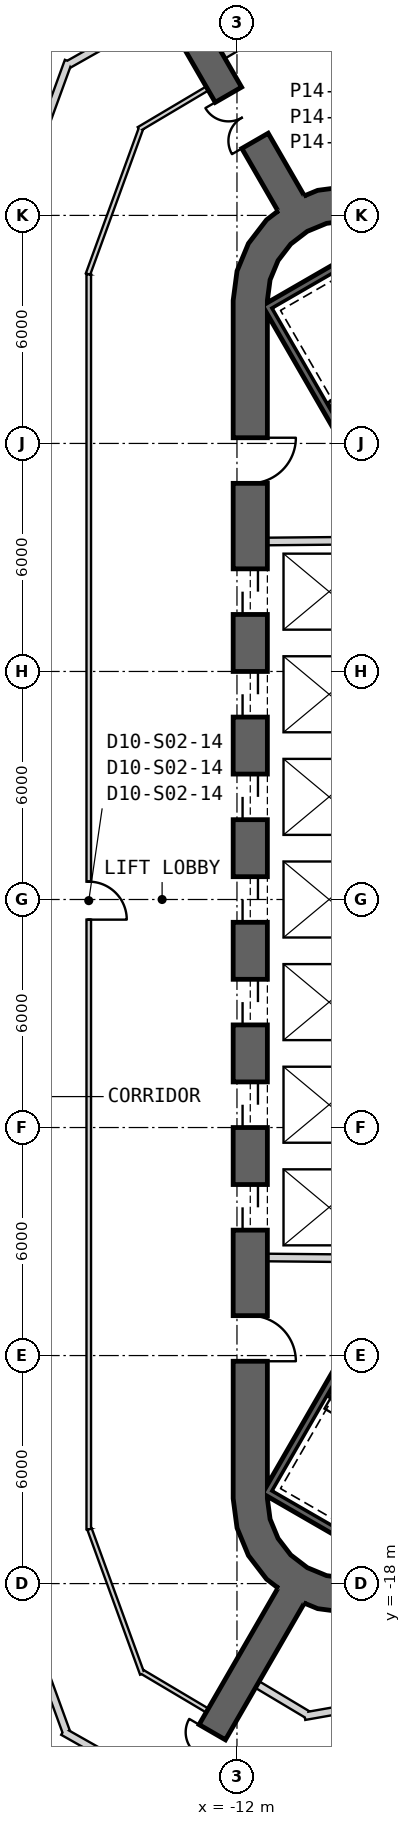
"""IFC4 building model, lengths in metres.
Left out: names, types, materials, properties, quantities, classifications, styles, units other than length and angle.
Written with IfcOpenShell. Run it as: python <this file> out.ifc"""

import sys

from ifc_helpers import new_model, si_unit, direction, frame, frame_2d, origin, place, context, subcontext, project, spatial, polyline, rectangle, outline, extrude, element, fill, save


model = new_model("IFC4")
c1 = context("Model", 3, precision=1e-05, world=origin(), true_north=direction((0.0, 1.0)))
c2 = subcontext(c1, "Body", "Model", "MODEL_VIEW")
j1 = project(units=[si_unit("LENGTHUNIT", "METRE"), si_unit("PLANEANGLEUNIT", "RADIAN")], contexts=[c1])
p1 = place(None, origin())
s1 = spatial("IfcSite", under=j1, at=p1, CompositionType="ELEMENT")
p2 = place(p1, origin())
s2 = spatial("IfcBuilding", under=s1, at=p2, CompositionType="ELEMENT")
p3 = place(p2, frame((0.0, 0.0, 70.1)))
s3 = spatial("IfcBuildingStorey", under=s2, at=p3, CompositionType="ELEMENT", Elevation=70.1)
p4 = place(p3, frame((-11.65, 15.762, 0.0), z_axis=(0.0, 0.0, 1.0), x_axis=(0.0, -1.0, 0.0)))
e1 = element("IfcWall", 1, at=p4, inside=s3, PredefinedType="SHEAR", context=c2, shape_type="SweptSolid", body=[
    extrude(rectangle(XDim=31.523, YDim=0.9, at=frame_2d((15.762, 0.0))), origin(), (0.0, 0.0, 1.0), 4.1),
])
p5 = place(p4, frame((7.062, 0.0, 0.0)))
e2 = element("IfcOpeningElement", 2, at=p5, cuts=e1, PredefinedType="OPENING", context=c2, shape_type="SweptSolid", body=[
    extrude(rectangle(XDim=1.2, YDim=2.4, at=frame_2d((0.6, 1.2))), frame((0.0, 0.46, 0.0), z_axis=(0.0, -1.0, 0.0), x_axis=(1.0, 0.0, 0.0)), (0.0, 0.0, 1.0), 0.92),
])
p6 = place(p4, frame((9.762, 0.0, 0.0)))
e3 = element("IfcOpeningElement", 3, at=p6, cuts=e1, PredefinedType="OPENING", context=c2, shape_type="SweptSolid", body=[
    extrude(rectangle(XDim=1.2, YDim=2.4, at=frame_2d((0.6, 1.2))), frame((0.0, 0.46, 0.0), z_axis=(0.0, -1.0, 0.0), x_axis=(1.0, 0.0, 0.0)), (0.0, 0.0, 1.0), 0.92),
])
p7 = place(p4, frame((12.462, 0.0, 0.0)))
e4 = element("IfcOpeningElement", 4, at=p7, cuts=e1, PredefinedType="OPENING", context=c2, shape_type="SweptSolid", body=[
    extrude(rectangle(XDim=1.2, YDim=2.4, at=frame_2d((0.6, 1.2))), frame((0.0, 0.46, 0.0), z_axis=(0.0, -1.0, 0.0), x_axis=(1.0, 0.0, 0.0)), (0.0, 0.0, 1.0), 0.92),
])
p8 = place(p4, frame((15.162, 0.0, 0.0)))
e5 = element("IfcOpeningElement", 5, at=p8, cuts=e1, PredefinedType="OPENING", context=c2, shape_type="SweptSolid", body=[
    extrude(rectangle(XDim=1.2, YDim=2.4, at=frame_2d((0.6, 1.2))), frame((0.0, 0.46, 0.0), z_axis=(0.0, -1.0, 0.0), x_axis=(1.0, 0.0, 0.0)), (0.0, 0.0, 1.0), 0.92),
])
p9 = place(p4, frame((17.862, 0.0, 0.0)))
e6 = element("IfcOpeningElement", 6, at=p9, cuts=e1, PredefinedType="OPENING", context=c2, shape_type="SweptSolid", body=[
    extrude(rectangle(XDim=1.2, YDim=2.4, at=frame_2d((0.6, 1.2))), frame((0.0, 0.46, 0.0), z_axis=(0.0, -1.0, 0.0), x_axis=(1.0, 0.0, 0.0)), (0.0, 0.0, 1.0), 0.92),
])
p10 = place(p4, frame((20.562, 0.0, 0.0)))
e7 = element("IfcOpeningElement", 7, at=p10, cuts=e1, PredefinedType="OPENING", context=c2, shape_type="SweptSolid", body=[
    extrude(rectangle(XDim=1.2, YDim=2.4, at=frame_2d((0.6, 1.2))), frame((0.0, 0.46, 0.0), z_axis=(0.0, -1.0, 0.0), x_axis=(1.0, 0.0, 0.0)), (0.0, 0.0, 1.0), 0.92),
])
p11 = place(p4, frame((23.262, 0.0, 0.0)))
e8 = element("IfcOpeningElement", 8, at=p11, cuts=e1, PredefinedType="OPENING", context=c2, shape_type="SweptSolid", body=[
    extrude(rectangle(XDim=1.2, YDim=2.4, at=frame_2d((0.6, 1.2))), frame((0.0, 0.46, 0.0), z_axis=(0.0, -1.0, 0.0), x_axis=(1.0, 0.0, 0.0)), (0.0, 0.0, 1.0), 0.92),
])
p12 = place(p4, frame((3.612, 0.0, 0.0)))
e9 = element("IfcOpeningElement", 9, at=p12, cuts=e1, PredefinedType="OPENING", context=c2, shape_type="SweptSolid", body=[
    extrude(rectangle(XDim=1.2, YDim=2.4, at=frame_2d((0.6, 1.2))), frame((0.0, 0.46, 0.0), z_axis=(0.0, -1.0, 0.0), x_axis=(1.0, 0.0, 0.0)), (0.0, 0.0, 1.0), 0.92),
])
p13 = place(p4, frame((26.712, 0.0, 0.0)))
e10 = element("IfcOpeningElement", 10, at=p13, cuts=e1, PredefinedType="OPENING", context=c2, shape_type="SweptSolid", body=[
    extrude(rectangle(XDim=1.2, YDim=2.4, at=frame_2d((0.6, 1.2))), frame((0.0, 0.46, 0.0), z_axis=(0.0, -1.0, 0.0), x_axis=(1.0, 0.0, 0.0)), (0.0, 0.0, 1.0), 0.92),
])
p14 = place(p3, origin())
e11 = element("IfcWall", 11, at=p14, inside=s3, PredefinedType="SHEAR", context=c2, shape_type="SweptSolid", body=[
    extrude(outline(polyline([(-7.6, 18.36), (-8.323, 18.659), (-9.1, 18.762), (-9.876, 18.659), (-10.6, 18.36), (-11.221, 17.883), (-11.698, 17.262), (-11.998, 16.538), (-12.1, 15.762), (-11.2, 15.762), (-11.128, 16.305), (-10.919, 16.812), (-10.585, 17.247), (-10.15, 17.58), (-9.644, 17.79), (-9.1, 17.862), (-8.556, 17.79), (-8.05, 17.58), (-7.6, 18.36)])), origin(), (0.0, 0.0, 1.0), 4.1),
])
p15 = place(p3, origin())
e12 = element("IfcWall", 12, at=p15, inside=s3, PredefinedType="SHEAR", context=c2, shape_type="SweptSolid", body=[
    extrude(outline(polyline([(-12.1, -15.762), (-11.998, -16.538), (-11.698, -17.262), (-11.221, -17.883), (-10.6, -18.36), (-9.876, -18.659), (-9.1, -18.762), (-8.323, -18.659), (-7.6, -18.36), (-8.05, -17.58), (-8.556, -17.79), (-9.1, -17.862), (-9.644, -17.79), (-10.15, -17.58), (-10.585, -17.247), (-10.919, -16.812), (-11.128, -16.305), (-11.2, -15.762), (-12.1, -15.762)])), origin(), (0.0, 0.0, 1.0), 4.1),
])
p16 = place(p3, frame((-10.575, 18.316, 0.0), z_axis=(0.0, 0.0, 1.0), x_axis=(-0.499998162141, 0.86602646487, 0.0)))
e13 = element("IfcWall", 13, at=p16, inside=s3, PredefinedType="SHEAR", context=c2, shape_type="SweptSolid", body=[
    extrude(rectangle(XDim=13.669, YDim=0.8, at=frame_2d((6.835, 0.0))), origin(), (0.0, 0.0, 1.0), 4.1),
])
p17 = place(p16, frame((1.9, 0.0, 0.0)))
e14 = element("IfcOpeningElement", 14, at=p17, cuts=e13, PredefinedType="OPENING", context=c2, shape_type="SweptSolid", body=[
    extrude(rectangle(XDim=1.4, YDim=2.4, at=frame_2d((0.7, 1.2))), frame((0.0, 0.41, 0.0), z_axis=(0.0, -1.0, 0.0), x_axis=(1.0, 0.0, 0.0)), (0.0, 0.0, 1.0), 0.82),
])
p18 = place(p3, frame((-10.575, -18.316, 0.0), z_axis=(0.0, 0.0, 1.0), x_axis=(-0.499998162141, -0.86602646487, 0.0)))
e15 = element("IfcWall", 15, at=p18, inside=s3, PredefinedType="SHEAR", context=c2, shape_type="SweptSolid", body=[
    extrude(rectangle(XDim=13.669, YDim=0.8, at=frame_2d((6.835, 0.0))), origin(), (0.0, 0.0, 1.0), 4.1),
])
p19 = place(p18, frame((4.15, 0.0, 0.0)))
e16 = element("IfcOpeningElement", 16, at=p19, cuts=e15, PredefinedType="OPENING", context=c2, shape_type="SweptSolid", body=[
    extrude(rectangle(XDim=1.4, YDim=2.4, at=frame_2d((0.7, 1.2))), frame((0.0, 0.41, 0.0), z_axis=(0.0, -1.0, 0.0), x_axis=(1.0, 0.0, 0.0)), (0.0, 0.0, 1.0), 0.82),
])
p20 = place(p3, frame((-11.2, 9.42, 0.0), z_axis=(0.0, 0.0, 1.0), x_axis=(0.999957167047, 0.009255488683, 0.0)))
e17 = element("IfcWall", 17, at=p20, inside=s3, PredefinedType="PLUMBINGWALL", context=c2, shape_type="SweptSolid", body=[
    extrude(rectangle(XDim=3.35, YDim=0.2, at=frame_2d((1.675, 0.0))), origin(), (0.0, 0.0, 1.0), 3.8),
])
p21 = place(p3, frame((-8.05, -9.449, 0.0), z_axis=(0.0, 0.0, 1.0), x_axis=(-0.999957467379, 0.009222983926, 0.0)))
e18 = element("IfcWall", 18, at=p21, inside=s3, PredefinedType="PLUMBINGWALL", context=c2, shape_type="SweptSolid", body=[
    extrude(rectangle(XDim=3.15, YDim=0.2, at=frame_2d((1.575, 0.0))), origin(), (0.0, 0.0, 1.0), 3.8),
])
p22 = place(p3, frame((-11.245, 15.678, -0.3), z_axis=(0.0, 0.0, 1.0), x_axis=(0.499977274689, -0.866038523851, 0.0)))
e19 = element("IfcWall", 19, at=p22, inside=s3, PredefinedType="SHEAR", context=c2, shape_type="SweptSolid", body=[
    extrude(rectangle(XDim=8.1, YDim=0.2, at=frame_2d((4.05, 0.0))), origin(), (0.0, 0.0, 1.0), 4.1),
])
for number, where, z_axis, x_axis in (
    (20, (-7.818, 17.541, -0.3), (0.0, 0.0, 1.0), (-0.866, -0.5, 0.0)),
    (21, (-11.282, -15.541, -0.3), (0.0, 0.0, 1.0), (0.866, -0.5, 0.0)),
):
    element("IfcWall", number, at=place(p3, frame(where, z_axis=z_axis, x_axis=x_axis)), inside=s3, PredefinedType="SHEAR", context=c2, shape_type="SweptSolid", body=[
        extrude(rectangle(XDim=3.8, YDim=0.2, at=frame_2d((1.9, 0.0))), origin(), (0.0, 0.0, 1.0), 4.1),
    ])
p23 = place(p3, frame((-7.196, -8.663, -0.3), z_axis=(0.0, 0.0, 1.0), x_axis=(-0.499997992926, -0.866026562566, 0.0)))
e22 = element("IfcWall", 22, at=p23, inside=s3, PredefinedType="SHEAR", context=c2, shape_type="SweptSolid", body=[
    extrude(rectangle(XDim=7.9, YDim=0.2, at=frame_2d((3.95, 0.0))), origin(), (0.0, 0.0, 1.0), 4.1),
])
p24 = place(p3, frame((-12.782, 21.339, 0.0), z_axis=(0.0, 0.0, 1.0), x_axis=(-0.859769901207, -0.510681619973, 0.0)))
e23 = element("IfcWall", 23, at=p24, inside=s3, PredefinedType="PARTITIONING", context=c2, shape_type="SweptSolid", body=[
    extrude(rectangle(XDim=2.093, YDim=0.12, at=frame_2d((1.046, 0.0))), origin(), (0.0, 0.0, 1.0), 3.8),
])
p25 = place(p3, frame((-14.528, 20.282, 0.0), z_axis=(0.0, 0.0, 1.0), x_axis=(-0.341969257767, -0.939711140054, 0.0)))
e24 = element("IfcWall", 24, at=p25, inside=s3, PredefinedType="PARTITIONING", context=c2, shape_type="SweptSolid", body=[
    extrude(rectangle(XDim=4.073, YDim=0.12, at=frame_2d((2.037, 0.0))), origin(), (0.0, 0.0, 1.0), 2.88),
])
p26 = place(p3, frame((-15.9, 16.451, 0.0), z_axis=(0.0, 0.0, 1.0), x_axis=(0.0, -1.0, 0.0)))
e25 = element("IfcWall", 25, at=p26, inside=s3, PredefinedType="PARTITIONING", context=c2, shape_type="SweptSolid", body=[
    extrude(rectangle(XDim=33.022, YDim=0.12, at=frame_2d((16.511, 0.0))), origin(), (0.0, 0.0, 1.0), 2.98),
])
p27 = place(p26, frame((15.981, 0.0, 0.0)))
e26 = element("IfcOpeningElement", 26, at=p27, cuts=e25, PredefinedType="OPENING", context=c2, shape_type="SweptSolid", body=[
    extrude(rectangle(XDim=1.0, YDim=2.1, at=frame_2d((0.5, 1.05))), frame((0.0, 0.07, 0.0), z_axis=(0.0, -1.0, 0.0), x_axis=(1.0, 0.0, 0.0)), (0.0, 0.0, 1.0), 0.14),
])
p28 = place(p3, frame((-15.879, -16.567, 0.0), z_axis=(0.0, 0.0, 1.0), x_axis=(0.341999322503, -0.939700198685, 0.0)))
e27 = element("IfcWall", 27, at=p28, inside=s3, PredefinedType="PARTITIONING", context=c2, shape_type="SweptSolid", body=[
    extrude(rectangle(XDim=4.054, YDim=0.12, at=frame_2d((2.027, 0.0))), origin(), (0.0, 0.0, 1.0), 2.88),
])
p29 = place(p3, frame((-14.494, -20.322, 0.0), z_axis=(0.0, 0.0, 1.0), x_axis=(0.859745408261, -0.510722853389, 0.0)))
e28 = element("IfcWall", 28, at=p29, inside=s3, PredefinedType="PARTITIONING", context=c2, shape_type="SweptSolid", body=[
    extrude(rectangle(XDim=1.991, YDim=0.12, at=frame_2d((0.996, 0.0))), origin(), (0.0, 0.0, 1.0), 3.8),
])
p30 = place(p3, frame((-16.576, -21.892, 0.0), z_axis=(0.0, 0.0, 1.0), x_axis=(0.870559817111, -0.492062602553, 0.0)))
e29 = element("IfcWall", 29, at=p30, inside=s3, PredefinedType="PARTITIONING", context=c2, shape_type="SweptSolid", body=[
    extrude(rectangle(XDim=3.01, YDim=0.2, at=frame_2d((1.505, 0.0))), origin(), (0.0, 0.0, 1.0), 3.8),
])
p31 = place(p3, frame((-18.334, -16.84, 0.0), z_axis=(0.0, 0.0, 1.0), x_axis=(0.342015877493, -0.939694173411, 0.0)))
e30 = element("IfcWall", 30, at=p31, inside=s3, PredefinedType="PARTITIONING", context=c2, shape_type="SweptSolid", body=[
    extrude(rectangle(XDim=5.389, YDim=0.2, at=frame_2d((2.694, 0.0))), origin(), (0.0, 0.0, 1.0), 2.88),
])
p32 = place(p3, frame((-16.435, 22.06, 0.0), z_axis=(0.0, 0.0, 1.0), x_axis=(-0.342032279434, -0.939688203515, 0.0)))
e31 = element("IfcWall", 31, at=p32, inside=s3, PredefinedType="PARTITIONING", context=c2, shape_type="SweptSolid", body=[
    extrude(rectangle(XDim=5.354, YDim=0.2, at=frame_2d((2.677, 0.0))), origin(), (0.0, 0.0, 1.0), 2.88),
])
p33 = place(p3, frame((-13.956, 23.373, 0.0), z_axis=(0.0, 0.0, 1.0), x_axis=(-0.870578825461, -0.492028971361, 0.0)))
e32 = element("IfcWall", 32, at=p33, inside=s3, PredefinedType="PARTITIONING", context=c2, shape_type="SweptSolid", body=[
    extrude(rectangle(XDim=2.844, YDim=0.2, at=frame_2d((1.422, 0.0))), origin(), (0.0, 0.0, 1.0), 3.8),
])
p34 = place(p3, frame((-10.339, 23.415, 0.0), z_axis=(0.0, 0.0, 1.0), x_axis=(-0.860316803263, -0.509759745393, 0.0)))
e33 = element("IfcWall", 33, at=p34, inside=s3, PredefinedType="PARTITIONING", context=c2, shape_type="SweptSolid", body=[
    extrude(rectangle(XDim=2.354, YDim=0.2, at=frame_2d((1.177, 0.0))), origin(), (0.0, 0.0, 1.0), 3.8),
])
p35 = place(p3, frame((-10.22, -21.49, 0.0), z_axis=(0.0, 0.0, 1.0), x_axis=(0.984805188344, 0.173662721995, 0.0)))
e34 = element("IfcWall", 34, at=p35, inside=s3, PredefinedType="PARTITIONING", context=c2, shape_type="SweptSolid", body=[
    extrude(rectangle(XDim=3.408, YDim=0.2, at=frame_2d((1.704, 0.0))), origin(), (0.0, 0.0, 1.0), 2.88),
])
p36 = place(p3, frame((-11.465, -20.657, 0.0), z_axis=(0.0, 0.0, 1.0), x_axis=(0.858376755127, -0.513019830276, 0.0)))
e35 = element("IfcWall", 35, at=p36, inside=s3, PredefinedType="PARTITIONING", context=c2, shape_type="SweptSolid", body=[
    extrude(rectangle(XDim=1.533, YDim=0.2, at=frame_2d((0.767, 0.0))), origin(), (0.0, 0.0, 1.0), 3.8),
])
p37 = place(p27, origin())
e36 = element("IfcDoor", 36, at=p37, inside=s3, OperationType="SINGLE_SWING_RIGHT", PredefinedType="NOTDEFINED", context=c2, shape_type="SweptSolid", body=[
    extrude(rectangle(XDim=1.0, YDim=2.1, at=frame_2d((0.5, 1.05))), frame((0.0, 0.025, 0.0), z_axis=(0.0, -1.0, 0.0), x_axis=(1.0, 0.0, 0.0)), (0.0, 0.0, 1.0), 0.05),
])
fill(e26, e36)
p38 = place(p5, origin())
e37 = element("IfcDoor", 37, at=p38, inside=s3, OperationType="SLIDING_TO_LEFT", PredefinedType="USERDEFINED", context=c2, shape_type="SweptSolid", body=[
    extrude(rectangle(XDim=1.2, YDim=2.4, at=frame_2d((0.6, 1.2))), frame((0.0, 0.025, 0.0), z_axis=(0.0, -1.0, 0.0), x_axis=(1.0, 0.0, 0.0)), (0.0, 0.0, 1.0), 0.05),
])
fill(e2, e37)
p39 = place(p6, origin())
e38 = element("IfcDoor", 38, at=p39, inside=s3, OperationType="SLIDING_TO_LEFT", PredefinedType="USERDEFINED", context=c2, shape_type="SweptSolid", body=[
    extrude(rectangle(XDim=1.2, YDim=2.4, at=frame_2d((0.6, 1.2))), frame((0.0, 0.025, 0.0), z_axis=(0.0, -1.0, 0.0), x_axis=(1.0, 0.0, 0.0)), (0.0, 0.0, 1.0), 0.05),
])
fill(e3, e38)
p40 = place(p7, origin())
e39 = element("IfcDoor", 39, at=p40, inside=s3, OperationType="SLIDING_TO_LEFT", PredefinedType="USERDEFINED", context=c2, shape_type="SweptSolid", body=[
    extrude(rectangle(XDim=1.2, YDim=2.4, at=frame_2d((0.6, 1.2))), frame((0.0, 0.025, 0.0), z_axis=(0.0, -1.0, 0.0), x_axis=(1.0, 0.0, 0.0)), (0.0, 0.0, 1.0), 0.05),
])
fill(e4, e39)
p41 = place(p8, origin())
e40 = element("IfcDoor", 40, at=p41, inside=s3, OperationType="SLIDING_TO_LEFT", PredefinedType="USERDEFINED", context=c2, shape_type="SweptSolid", body=[
    extrude(rectangle(XDim=1.2, YDim=2.4, at=frame_2d((0.6, 1.2))), frame((0.0, 0.025, 0.0), z_axis=(0.0, -1.0, 0.0), x_axis=(1.0, 0.0, 0.0)), (0.0, 0.0, 1.0), 0.05),
])
fill(e5, e40)
p42 = place(p9, origin())
e41 = element("IfcDoor", 41, at=p42, inside=s3, OperationType="SLIDING_TO_LEFT", PredefinedType="USERDEFINED", context=c2, shape_type="SweptSolid", body=[
    extrude(rectangle(XDim=1.2, YDim=2.4, at=frame_2d((0.6, 1.2))), frame((0.0, 0.025, 0.0), z_axis=(0.0, -1.0, 0.0), x_axis=(1.0, 0.0, 0.0)), (0.0, 0.0, 1.0), 0.05),
])
fill(e6, e41)
p43 = place(p10, origin())
e42 = element("IfcDoor", 42, at=p43, inside=s3, OperationType="SLIDING_TO_LEFT", PredefinedType="USERDEFINED", context=c2, shape_type="SweptSolid", body=[
    extrude(rectangle(XDim=1.2, YDim=2.4, at=frame_2d((0.6, 1.2))), frame((0.0, 0.025, 0.0), z_axis=(0.0, -1.0, 0.0), x_axis=(1.0, 0.0, 0.0)), (0.0, 0.0, 1.0), 0.05),
])
fill(e7, e42)
p44 = place(p11, origin())
e43 = element("IfcDoor", 43, at=p44, inside=s3, OperationType="SLIDING_TO_LEFT", PredefinedType="USERDEFINED", context=c2, shape_type="SweptSolid", body=[
    extrude(rectangle(XDim=1.2, YDim=2.4, at=frame_2d((0.6, 1.2))), frame((0.0, 0.025, 0.0), z_axis=(0.0, -1.0, 0.0), x_axis=(1.0, 0.0, 0.0)), (0.0, 0.0, 1.0), 0.05),
])
fill(e8, e43)
p45 = place(p12, origin())
e44 = element("IfcDoor", 44, at=p45, inside=s3, OperationType="SINGLE_SWING_RIGHT", PredefinedType="USERDEFINED", context=c2, shape_type="SweptSolid", body=[
    extrude(rectangle(XDim=1.2, YDim=2.4, at=frame_2d((0.6, 1.2))), frame((0.0, 0.025, 0.0), z_axis=(0.0, -1.0, 0.0), x_axis=(1.0, 0.0, 0.0)), (0.0, 0.0, 1.0), 0.05),
])
fill(e9, e44)
p46 = place(p13, origin())
e45 = element("IfcDoor", 45, at=p46, inside=s3, OperationType="SINGLE_SWING_RIGHT", PredefinedType="USERDEFINED", context=c2, shape_type="SweptSolid", body=[
    extrude(rectangle(XDim=1.2, YDim=2.4, at=frame_2d((0.6, 1.2))), frame((0.0, 0.025, 0.0), z_axis=(0.0, -1.0, 0.0), x_axis=(1.0, 0.0, 0.0)), (0.0, 0.0, 1.0), 0.05),
])
fill(e10, e45)
p47 = place(p17, origin())
e46 = element("IfcDoor", 46, at=p47, inside=s3, OperationType="DOUBLE_DOOR_SINGLE_SWING", PredefinedType="NOTDEFINED", context=c2, shape_type="SweptSolid", body=[
    extrude(rectangle(XDim=1.4, YDim=2.4, at=frame_2d((0.7, 1.2))), frame((0.0, 0.025, 0.0), z_axis=(0.0, -1.0, 0.0), x_axis=(1.0, 0.0, 0.0)), (0.0, 0.0, 1.0), 0.05),
])
fill(e14, e46)
p48 = place(p19, origin())
e47 = element("IfcDoor", 47, at=p48, inside=s3, OperationType="DOUBLE_DOOR_SINGLE_SWING", PredefinedType="NOTDEFINED", context=c2, shape_type="SweptSolid", body=[
    extrude(rectangle(XDim=1.4, YDim=2.4, at=frame_2d((0.7, 1.2))), frame((0.0, 0.025, 0.0), z_axis=(0.0, -1.0, 0.0), x_axis=(1.0, 0.0, 0.0)), (0.0, 0.0, 1.0), 0.05),
])
fill(e16, e47)
save(model, sys.argv[1])
